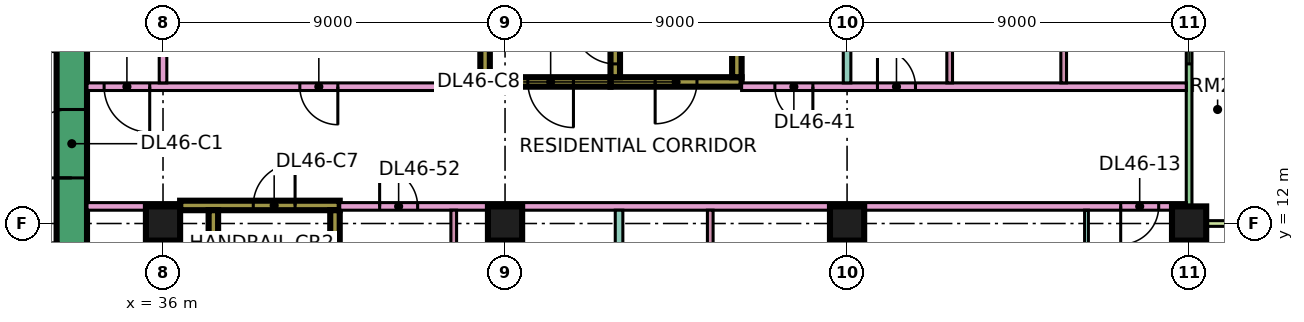
"""IFC4 building model, lengths in metres.
Left out: names, types, materials, properties, quantities, classifications, styles, units other than length and angle.
Written with IfcOpenShell. Run it as: python <this file> out.ifc"""

import sys

from ifc_helpers import new_model, si_unit, direction, frame, frame_2d, origin, origin_2d, place, context, subcontext, project, spatial, rectangle, extrude, element, fill, save


model = new_model("IFC4")
c1 = context("Model", 3, precision=1e-05, world=origin(), true_north=direction((0.0, 1.0)))
c2 = subcontext(c1, "Body", "Model", "MODEL_VIEW")
j1 = project(units=[si_unit("LENGTHUNIT", "METRE"), si_unit("PLANEANGLEUNIT", "RADIAN")], contexts=[c1])
p1 = place(None, origin())
s1 = spatial("IfcSite", under=j1, at=p1, CompositionType="ELEMENT")
p2 = place(p1, origin())
s2 = spatial("IfcBuilding", under=s1, at=p2, CompositionType="ELEMENT")
p3 = place(p2, frame((0.0, 0.0, 198.65)))
s3 = spatial("IfcBuildingStorey", under=s2, at=p3, CompositionType="ELEMENT", Elevation=198.65)
for number, where, z_axis, x_axis in (
    (1, (36.0, 12.0, 0.0), (0.0, 0.0, 1.0), (1.0, 0.0, 0.0)),
    (2, (45.0, 12.0, 0.0), (0.0, 0.0, 1.0), (1.0, 0.0, 0.0)),
    (3, (54.0, 12.0, 0.0), (0.0, 0.0, 1.0), (1.0, 0.0, 0.0)),
    (4, (63.0, 12.0, 0.0), (0.0, 0.0, 1.0), (1.0, 0.0, 0.0)),
):
    element("IfcColumn", number, at=place(p3, frame(where, z_axis=z_axis, x_axis=x_axis)), inside=s3, PredefinedType="COLUMN", context=c2, shape_type="SweptSolid", body=[
        extrude(rectangle(XDim=0.9, YDim=0.9, at=origin_2d()), origin(), (0.0, 0.0, 1.0), 3.75),
    ])
p4 = place(p3, frame((33.6, 7.8, 0.0), z_axis=(0.0, 0.0, 1.0), x_axis=(0.0, 1.0, 0.0)))
e5 = element("IfcWall", 5, at=p4, inside=s3, PredefinedType="SHEAR", context=c2, shape_type="SweptSolid", body=[
    extrude(rectangle(XDim=11.4, YDim=0.8, at=frame_2d((5.7, 0.0))), origin(), (0.0, 0.0, 1.0), 3.75),
])
p5 = place(p4, frame((5.4, 0.0, 0.0)))
e6 = element("IfcOpeningElement", 6, at=p5, cuts=e5, PredefinedType="OPENING", context=c2, shape_type="SweptSolid", body=[
    extrude(rectangle(XDim=1.8, YDim=2.4, at=frame_2d((0.9, 1.2))), frame((0.0, 0.41, 0.0), z_axis=(0.0, -1.0, 0.0), x_axis=(1.0, 0.0, 0.0)), (0.0, 0.0, 1.0), 0.82),
])
p6 = place(p3, frame((36.45, 12.475, 0.0), z_axis=(0.0, 0.0, 1.0), x_axis=(1.0, 0.0, 0.0)))
e7 = element("IfcWall", 7, at=p6, inside=s3, PredefinedType="SHEAR", context=c2, shape_type="SweptSolid", body=[
    extrude(rectangle(XDim=4.2, YDim=0.25, at=frame_2d((2.1, 0.0))), origin(), (0.0, 0.0, 1.0), 3.75),
])
p7 = place(p6, frame((1.925, 0.0, 0.0)))
e8 = element("IfcOpeningElement", 8, at=p7, cuts=e7, PredefinedType="OPENING", context=c2, shape_type="SweptSolid", body=[
    extrude(rectangle(XDim=1.1, YDim=2.2, at=frame_2d((0.55, 1.1))), frame((0.0, 0.135, 0.0), z_axis=(0.0, -1.0, 0.0), x_axis=(1.0, 0.0, 0.0)), (0.0, 0.0, 1.0), 0.27),
])
for number, where, z_axis, x_axis in (
    (9, (37.325, 5.85, 0.0), (0.0, 0.0, 1.0), (0.0, 1.0, 0.0)),
    (10, (40.525, 5.85, 0.0), (0.0, 0.0, 1.0), (0.0, 1.0, 0.0)),
):
    element("IfcWall", number, at=place(p3, frame(where, z_axis=z_axis, x_axis=x_axis)), inside=s3, PredefinedType="SHEAR", context=c2, shape_type="SweptSolid", body=[
        extrude(rectangle(XDim=6.5, YDim=0.25, at=frame_2d((3.25, 0.0))), origin(), (0.0, 0.0, 1.0), 3.75),
    ])
p8 = place(p3, frame((47.775, 15.725, 0.0), z_axis=(0.0, 0.0, 1.0), x_axis=(1.0, 0.0, 0.0)))
e11 = element("IfcWall", 11, at=p8, inside=s3, PredefinedType="SHEAR", context=c2, shape_type="SweptSolid", body=[
    extrude(rectangle(XDim=3.45, YDim=0.25, at=frame_2d((1.725, 0.0))), origin(), (0.0, 0.0, 1.0), 3.75),
])
p9 = place(p8, frame((1.175, 0.0, 0.0)))
e12 = element("IfcOpeningElement", 12, at=p9, cuts=e11, PredefinedType="OPENING", context=c2, shape_type="SweptSolid", body=[
    extrude(rectangle(XDim=1.1, YDim=2.2, at=frame_2d((0.55, 1.1))), frame((0.0, 0.135, 0.0), z_axis=(0.0, -1.0, 0.0), x_axis=(1.0, 0.0, 0.0)), (0.0, 0.0, 1.0), 0.27),
])
p10 = place(p3, frame((47.9, 15.85, 0.0), z_axis=(0.0, 0.0, 1.0), x_axis=(0.0, 1.0, 0.0)))
e13 = element("IfcWall", 13, at=p10, inside=s3, PredefinedType="SHEAR", context=c2, shape_type="SweptSolid", body=[
    extrude(rectangle(XDim=6.5, YDim=0.25, at=frame_2d((3.25, 0.0))), origin(), (0.0, 0.0, 1.0), 3.75),
])
p11 = place(p10, frame((0.35, 0.0, 0.0)))
e14 = element("IfcOpeningElement", 14, at=p11, cuts=e13, PredefinedType="OPENING", context=c2, shape_type="SweptSolid", body=[
    extrude(rectangle(XDim=1.1, YDim=2.2, at=frame_2d((0.55, 1.1))), frame((0.0, 0.135, 0.0), z_axis=(0.0, -1.0, 0.0), x_axis=(1.0, 0.0, 0.0)), (0.0, 0.0, 1.0), 0.27),
])
p12 = place(p3, frame((51.1, 15.85, 0.0), z_axis=(0.0, 0.0, 1.0), x_axis=(0.0, 1.0, 0.0)))
e15 = element("IfcWall", 15, at=p12, inside=s3, PredefinedType="SHEAR", context=c2, shape_type="SweptSolid", body=[
    extrude(rectangle(XDim=6.5, YDim=0.25, at=frame_2d((3.25, 0.0))), origin(), (0.0, 0.0, 1.0), 3.75),
])
p13 = place(p3, frame((44.35, 15.725, 0.0), z_axis=(0.0, 0.0, 1.0), x_axis=(1.0, 0.0, 0.0)))
e16 = element("IfcWall", 16, at=p13, inside=s3, PredefinedType="SHEAR", context=c2, shape_type="SweptSolid", body=[
    extrude(rectangle(XDim=3.425, YDim=0.25, at=frame_2d((1.712, 0.0))), origin(), (0.0, 0.0, 1.0), 3.75),
])
p14 = place(p13, frame((1.25, 0.0, 0.0)))
e17 = element("IfcOpeningElement", 17, at=p14, cuts=e16, PredefinedType="OPENING", context=c2, shape_type="SweptSolid", body=[
    extrude(rectangle(XDim=1.2, YDim=2.2, at=frame_2d((0.6, 1.1))), frame((0.0, 0.135, 0.0), z_axis=(0.0, -1.0, 0.0), x_axis=(1.0, 0.0, 0.0)), (0.0, 0.0, 1.0), 0.27),
])
p15 = place(p3, frame((44.475, 15.85, 0.0), z_axis=(0.0, 0.0, 1.0), x_axis=(0.0, 1.0, 0.0)))
e18 = element("IfcWall", 18, at=p15, inside=s3, PredefinedType="SHEAR", context=c2, shape_type="SweptSolid", body=[
    extrude(rectangle(XDim=6.5, YDim=0.25, at=frame_2d((3.25, 0.0))), origin(), (0.0, 0.0, 1.0), 3.75),
])
p16 = place(p15, frame((1.75, 0.0, 0.0)))
e19 = element("IfcOpeningElement", 19, at=p16, cuts=e18, PredefinedType="OPENING", context=c2, shape_type="SweptSolid", body=[
    extrude(rectangle(XDim=1.1, YDim=2.2, at=frame_2d((0.55, 1.1))), frame((0.0, 0.135, 0.0), z_axis=(0.0, -1.0, 0.0), x_axis=(1.0, 0.0, 0.0)), (0.0, 0.0, 1.0), 0.27),
])
p17 = place(p15, frame((4.3, 0.0, 0.0)))
e20 = element("IfcOpeningElement", 20, at=p17, cuts=e18, PredefinedType="OPENING", context=c2, shape_type="SweptSolid", body=[
    extrude(rectangle(XDim=1.1, YDim=2.2, at=frame_2d((0.55, 1.1))), frame((0.0, 0.135, 0.0), z_axis=(0.0, -1.0, 0.0), x_axis=(1.0, 0.0, 0.0)), (0.0, 0.0, 1.0), 0.27),
])
p18 = place(p3, frame((63.0, 12.075, 0.0), z_axis=(0.0, 0.0, 1.0), x_axis=(0.0, 1.0, 0.0)))
e21 = element("IfcWall", 21, at=p18, inside=s3, PredefinedType="SOLIDWALL", context=c2, shape_type="SweptSolid", body=[
    extrude(rectangle(XDim=10.35, YDim=0.15, at=frame_2d((5.175, 0.0))), origin(), (0.0, 0.0, 1.0), 3.35),
])
p19 = place(p18, frame((4.125, 0.0, 0.45)))
e22 = element("IfcOpeningElement", 22, at=p19, cuts=e21, PredefinedType="OPENING", context=c2, shape_type="SweptSolid", body=[
    extrude(rectangle(XDim=1.8, YDim=2.4, at=frame_2d((0.9, 1.2))), frame((0.0, 0.085, 0.0), z_axis=(0.0, -1.0, 0.0), x_axis=(1.0, 0.0, 0.0)), (0.0, 0.0, 1.0), 0.17),
])
p20 = place(p18, frame((8.137, 0.0, 0.45)))
e23 = element("IfcOpeningElement", 23, at=p20, cuts=e21, PredefinedType="OPENING", context=c2, shape_type="SweptSolid", body=[
    extrude(rectangle(XDim=1.8, YDim=2.4, at=frame_2d((0.9, 1.2))), frame((0.0, 0.085, 0.0), z_axis=(0.0, -1.0, 0.0), x_axis=(1.0, 0.0, 0.0)), (0.0, 0.0, 1.0), 0.17),
])
p21 = place(p3, frame((64.5, 12.0, 0.0), z_axis=(0.0, 0.0, 1.0), x_axis=(-1.0, 0.0, 0.0)))
e24 = element("IfcWall", 24, at=p21, inside=s3, PredefinedType="SOLIDWALL", context=c2, shape_type="SweptSolid", body=[
    extrude(rectangle(XDim=1.5, YDim=0.15, at=frame_2d((0.75, 0.0))), origin(), (0.0, 0.0, 1.0), 3.35),
])
p22 = place(p3, frame((34.0, 12.45, 0.0), z_axis=(0.0, 0.0, 1.0), x_axis=(1.0, 0.0, 0.0)))
e25 = element("IfcWall", 25, at=p22, inside=s3, PredefinedType="PARTITIONING", context=c2, shape_type="SweptSolid", body=[
    extrude(rectangle(XDim=2.451, YDim=0.2, at=frame_2d((1.226, 0.0))), origin(), (0.0, 0.0, 1.0), 3.35),
])
p23 = place(p3, frame((34.0, 15.6, 0.0), z_axis=(0.0, 0.0, 1.0), x_axis=(1.0, 0.0, 0.0)))
e26 = element("IfcWall", 26, at=p23, inside=s3, PredefinedType="PARTITIONING", context=c2, shape_type="SweptSolid", body=[
    extrude(rectangle(XDim=10.35, YDim=0.2, at=frame_2d((5.175, 0.0))), origin(), (0.0, 0.0, 1.0), 3.35),
])
p24 = place(p23, frame((5.6, 0.0, 0.0)))
e27 = element("IfcOpeningElement", 27, at=p24, cuts=e26, PredefinedType="OPENING", context=c2, shape_type="SweptSolid", body=[
    extrude(rectangle(XDim=1.0, YDim=2.1, at=frame_2d((0.5, 1.05))), frame((0.0, 0.11, 0.0), z_axis=(0.0, -1.0, 0.0), x_axis=(1.0, 0.0, 0.0)), (0.0, 0.0, 1.0), 0.22),
])
p25 = place(p23, frame((0.45, 0.0, 0.0)))
e28 = element("IfcOpeningElement", 28, at=p25, cuts=e26, PredefinedType="OPENING", context=c2, shape_type="SweptSolid", body=[
    extrude(rectangle(XDim=1.2, YDim=2.1, at=frame_2d((0.6, 1.05))), frame((0.0, 0.11, 0.0), z_axis=(0.0, -1.0, 0.0), x_axis=(1.0, 0.0, 0.0)), (0.0, 0.0, 1.0), 0.22),
])
p26 = place(p3, frame((36.0, 15.7, 0.0), z_axis=(0.0, 0.0, 1.0), x_axis=(0.0, 1.0, 0.0)))
e29 = element("IfcWall", 29, at=p26, inside=s3, PredefinedType="PARTITIONING", context=c2, shape_type="SweptSolid", body=[
    extrude(rectangle(XDim=8.3, YDim=0.2, at=frame_2d((4.15, 0.0))), origin(), (0.0, 0.0, 1.0), 3.35),
])
p27 = place(p3, frame((40.65, 12.45, 0.0), z_axis=(0.0, 0.0, 1.0), x_axis=(1.0, 0.0, 0.0)))
e30 = element("IfcWall", 30, at=p27, inside=s3, PredefinedType="PARTITIONING", context=c2, shape_type="SweptSolid", body=[
    extrude(rectangle(XDim=22.276, YDim=0.2, at=frame_2d((11.138, 0.0))), origin(), (0.0, 0.0, 1.0), 3.35),
])
p28 = place(p27, frame((20.55, 0.0, 0.0)))
e31 = element("IfcOpeningElement", 31, at=p28, cuts=e30, PredefinedType="OPENING", context=c2, shape_type="SweptSolid", body=[
    extrude(rectangle(XDim=1.0, YDim=2.1, at=frame_2d((0.5, 1.05))), frame((0.0, 0.11, 0.0), z_axis=(0.0, -1.0, 0.0), x_axis=(1.0, 0.0, 0.0)), (0.0, 0.0, 1.0), 0.22),
])
p29 = place(p27, frame((1.05, 0.0, 0.0)))
e32 = element("IfcOpeningElement", 32, at=p29, cuts=e30, PredefinedType="OPENING", context=c2, shape_type="SweptSolid", body=[
    extrude(rectangle(XDim=1.0, YDim=2.1, at=frame_2d((0.5, 1.05))), frame((0.0, 0.11, 0.0), z_axis=(0.0, -1.0, 0.0), x_axis=(1.0, 0.0, 0.0)), (0.0, 0.0, 1.0), 0.22),
])
p30 = place(p3, frame((43.65, 5.825, 0.0), z_axis=(0.0, 0.0, 1.0), x_axis=(0.0, 1.0, 0.0)))
e33 = element("IfcWall", 33, at=p30, inside=s3, PredefinedType="PARTITIONING", context=c2, shape_type="SweptSolid", body=[
    extrude(rectangle(XDim=6.525, YDim=0.15, at=frame_2d((3.263, 0.0))), origin(), (0.0, 0.0, 1.0), 3.35),
])
p31 = place(p30, frame((4.425, 0.0, 0.0)))
e34 = element("IfcOpeningElement", 34, at=p31, cuts=e33, PredefinedType="OPENING", context=c2, shape_type="SweptSolid", body=[
    extrude(rectangle(XDim=0.9, YDim=2.1, at=frame_2d((0.45, 1.05))), frame((0.0, 0.085, 0.0), z_axis=(0.0, -1.0, 0.0), x_axis=(1.0, 0.0, 0.0)), (0.0, 0.0, 1.0), 0.17),
])
p32 = place(p3, frame((48.0, 0.0, 0.0), z_axis=(0.0, 0.0, 1.0), x_axis=(0.0, 1.0, 0.0)))
e35 = element("IfcWall", 35, at=p32, inside=s3, PredefinedType="PARTITIONING", context=c2, shape_type="SweptSolid", body=[
    extrude(rectangle(XDim=12.35, YDim=0.2, at=frame_2d((6.175, 0.0))), origin(), (0.0, 0.0, 1.0), 3.35),
])
p33 = place(p3, frame((50.4, 7.725, 0.0), z_axis=(0.0, 0.0, 1.0), x_axis=(0.0, 1.0, 0.0)))
e36 = element("IfcWall", 36, at=p33, inside=s3, PredefinedType="PARTITIONING", context=c2, shape_type="SweptSolid", body=[
    extrude(rectangle(XDim=4.625, YDim=0.15, at=frame_2d((2.312, 0.0))), origin(), (0.0, 0.0, 1.0), 3.35),
])
p34 = place(p3, frame((51.225, 15.6, 0.0), z_axis=(0.0, 0.0, 1.0), x_axis=(1.0, 0.0, 0.0)))
e37 = element("IfcWall", 37, at=p34, inside=s3, PredefinedType="PARTITIONING", context=c2, shape_type="SweptSolid", body=[
    extrude(rectangle(XDim=11.701, YDim=0.2, at=frame_2d((5.851, 0.0))), origin(), (0.0, 0.0, 1.0), 3.35),
])
p35 = place(p34, frame((3.575, 0.0, 0.0)))
e38 = element("IfcOpeningElement", 38, at=p35, cuts=e37, PredefinedType="OPENING", context=c2, shape_type="SweptSolid", body=[
    extrude(rectangle(XDim=1.0, YDim=2.1, at=frame_2d((0.5, 1.05))), frame((0.0, 0.11, 0.0), z_axis=(0.0, -1.0, 0.0), x_axis=(1.0, 0.0, 0.0)), (0.0, 0.0, 1.0), 0.22),
])
p36 = place(p34, frame((0.875, 0.0, 0.0)))
e39 = element("IfcOpeningElement", 39, at=p36, cuts=e37, PredefinedType="OPENING", context=c2, shape_type="SweptSolid", body=[
    extrude(rectangle(XDim=1.0, YDim=2.1, at=frame_2d((0.5, 1.05))), frame((0.0, 0.11, 0.0), z_axis=(0.0, -1.0, 0.0), x_axis=(1.0, 0.0, 0.0)), (0.0, 0.0, 1.0), 0.22),
])
p37 = place(p3, frame((54.0, 7.725, 0.0), z_axis=(0.0, 0.0, 1.0), x_axis=(0.0, 1.0, 0.0)))
e40 = element("IfcWall", 40, at=p37, inside=s3, PredefinedType="PARTITIONING", context=c2, shape_type="SweptSolid", body=[
    extrude(rectangle(XDim=4.625, YDim=0.15, at=frame_2d((2.312, 0.0))), origin(), (0.0, 0.0, 1.0), 3.35),
])
p38 = place(p3, frame((54.0, 15.7, 0.0), z_axis=(0.0, 0.0, 1.0), x_axis=(0.0, 1.0, 0.0)))
e41 = element("IfcWall", 41, at=p38, inside=s3, PredefinedType="PARTITIONING", context=c2, shape_type="SweptSolid", body=[
    extrude(rectangle(XDim=8.3, YDim=0.2, at=frame_2d((4.15, 0.0))), origin(), (0.0, 0.0, 1.0), 3.35),
])
for number, where, z_axis, x_axis in (
    (42, (56.7, 15.7, 0.0), (0.0, 0.0, 1.0), (0.0, 1.0, 0.0)),
    (43, (59.7, 15.7, 0.0), (0.0, 0.0, 1.0), (0.0, 1.0, 0.0)),
):
    element("IfcWall", number, at=place(p3, frame(where, z_axis=z_axis, x_axis=x_axis)), inside=s3, PredefinedType="PARTITIONING", context=c2, shape_type="SweptSolid", body=[
        extrude(rectangle(XDim=2.825, YDim=0.15, at=frame_2d((1.413, 0.0))), origin(), (0.0, 0.0, 1.0), 3.35),
    ])
p39 = place(p3, frame((60.3, 7.725, 0.0), z_axis=(0.0, 0.0, 1.0), x_axis=(0.0, 1.0, 0.0)))
e44 = element("IfcWall", 44, at=p39, inside=s3, PredefinedType="PARTITIONING", context=c2, shape_type="SweptSolid", body=[
    extrude(rectangle(XDim=4.625, YDim=0.1, at=frame_2d((2.312, 0.0))), origin(), (0.0, 0.0, 1.0), 3.35),
])
p40 = place(p39, frame((1.875, 0.0, 0.0)))
e45 = element("IfcOpeningElement", 45, at=p40, cuts=e44, PredefinedType="OPENING", context=c2, shape_type="SweptSolid", body=[
    extrude(rectangle(XDim=0.9, YDim=2.1, at=frame_2d((0.45, 1.05))), frame((0.0, 0.06, 0.0), z_axis=(0.0, -1.0, 0.0), x_axis=(1.0, 0.0, 0.0)), (0.0, 0.0, 1.0), 0.12),
])
p41 = place(p19, origin())
e46 = element("IfcWindow", 46, at=p41, inside=s3, PartitioningType="SINGLE_PANEL", PredefinedType="WINDOW", context=c2, shape_type="SweptSolid", body=[
    extrude(rectangle(XDim=1.8, YDim=2.4, at=frame_2d((0.9, 1.2))), frame((0.0, 0.03, 0.0), z_axis=(0.0, -1.0, 0.0), x_axis=(1.0, 0.0, 0.0)), (0.0, 0.0, 1.0), 0.06),
])
fill(e22, e46)
p42 = place(p5, origin())
e47 = element("IfcDoor", 47, at=p42, inside=s3, OperationType="DOUBLE_DOOR_SINGLE_SWING", PredefinedType="DOOR", context=c2, shape_type="SweptSolid", body=[
    extrude(rectangle(XDim=1.8, YDim=2.4, at=frame_2d((0.9, 1.2))), frame((0.0, 0.025, 0.0), z_axis=(0.0, -1.0, 0.0), x_axis=(1.0, 0.0, 0.0)), (0.0, 0.0, 1.0), 0.05),
])
fill(e6, e47)
p43 = place(p7, frame((1.1, 0.0, 0.0), z_axis=(0.0, 0.0, 1.0), x_axis=(-1.0, 0.0, 0.0)))
e48 = element("IfcDoor", 48, at=p43, inside=s3, OperationType="SINGLE_SWING_RIGHT", PredefinedType="DOOR", context=c2, shape_type="SweptSolid", body=[
    extrude(rectangle(XDim=1.1, YDim=2.2, at=frame_2d((0.55, 1.1))), frame((0.0, 0.025, 0.0), z_axis=(0.0, -1.0, 0.0), x_axis=(1.0, 0.0, 0.0)), (0.0, 0.0, 1.0), 0.05),
])
fill(e8, e48)
p44 = place(p9, frame((1.1, 0.0, 0.0), z_axis=(0.0, 0.0, 1.0), x_axis=(-1.0, 0.0, 0.0)))
e49 = element("IfcDoor", 49, at=p44, inside=s3, OperationType="SINGLE_SWING_LEFT", PredefinedType="DOOR", context=c2, shape_type="SweptSolid", body=[
    extrude(rectangle(XDim=1.1, YDim=2.2, at=frame_2d((0.55, 1.1))), frame((0.0, 0.025, 0.0), z_axis=(0.0, -1.0, 0.0), x_axis=(1.0, 0.0, 0.0)), (0.0, 0.0, 1.0), 0.05),
])
fill(e12, e49)
p45 = place(p14, origin())
e50 = element("IfcDoor", 50, at=p45, inside=s3, OperationType="SINGLE_SWING_RIGHT", PredefinedType="DOOR", context=c2, shape_type="SweptSolid", body=[
    extrude(rectangle(XDim=1.2, YDim=2.2, at=frame_2d((0.6, 1.1))), frame((0.0, 0.025, 0.0), z_axis=(0.0, -1.0, 0.0), x_axis=(1.0, 0.0, 0.0)), (0.0, 0.0, 1.0), 0.05),
])
fill(e17, e50)
p46 = place(p11, frame((1.1, 0.0, 0.0), z_axis=(0.0, 0.0, 1.0), x_axis=(-1.0, 0.0, 0.0)))
e51 = element("IfcDoor", 51, at=p46, inside=s3, OperationType="SINGLE_SWING_RIGHT", PredefinedType="DOOR", context=c2, shape_type="SweptSolid", body=[
    extrude(rectangle(XDim=1.1, YDim=2.2, at=frame_2d((0.55, 1.1))), frame((0.0, 0.025, 0.0), z_axis=(0.0, -1.0, 0.0), x_axis=(1.0, 0.0, 0.0)), (0.0, 0.0, 1.0), 0.05),
])
fill(e14, e51)
p47 = place(p24, origin())
e52 = element("IfcDoor", 52, at=p47, inside=s3, OperationType="SINGLE_SWING_RIGHT", PredefinedType="DOOR", context=c2, shape_type="SweptSolid", body=[
    extrude(rectangle(XDim=1.0, YDim=2.1, at=frame_2d((0.5, 1.05))), frame((0.0, 0.025, 0.0), z_axis=(0.0, -1.0, 0.0), x_axis=(1.0, 0.0, 0.0)), (0.0, 0.0, 1.0), 0.05),
])
fill(e27, e52)
p48 = place(p35, origin())
e53 = element("IfcDoor", 53, at=p48, inside=s3, OperationType="SINGLE_SWING_LEFT", PredefinedType="DOOR", context=c2, shape_type="SweptSolid", body=[
    extrude(rectangle(XDim=1.0, YDim=2.1, at=frame_2d((0.5, 1.05))), frame((0.0, 0.025, 0.0), z_axis=(0.0, -1.0, 0.0), x_axis=(1.0, 0.0, 0.0)), (0.0, 0.0, 1.0), 0.05),
])
fill(e38, e53)
p49 = place(p28, frame((1.0, 0.0, 0.0), z_axis=(0.0, 0.0, 1.0), x_axis=(-1.0, 0.0, 0.0)))
e54 = element("IfcDoor", 54, at=p49, inside=s3, OperationType="SINGLE_SWING_LEFT", PredefinedType="DOOR", context=c2, shape_type="SweptSolid", body=[
    extrude(rectangle(XDim=1.0, YDim=2.1, at=frame_2d((0.5, 1.05))), frame((0.0, 0.025, 0.0), z_axis=(0.0, -1.0, 0.0), x_axis=(1.0, 0.0, 0.0)), (0.0, 0.0, 1.0), 0.05),
])
fill(e31, e54)
p50 = place(p25, origin())
e55 = element("IfcDoor", 55, at=p50, inside=s3, OperationType="SINGLE_SWING_RIGHT", PredefinedType="DOOR", context=c2, shape_type="SweptSolid", body=[
    extrude(rectangle(XDim=1.2, YDim=2.1, at=frame_2d((0.6, 1.05))), frame((0.0, 0.025, 0.0), z_axis=(0.0, -1.0, 0.0), x_axis=(1.0, 0.0, 0.0)), (0.0, 0.0, 1.0), 0.05),
])
fill(e28, e55)
p51 = place(p36, origin())
e56 = element("IfcDoor", 56, at=p51, inside=s3, OperationType="SINGLE_SWING_RIGHT", PredefinedType="DOOR", context=c2, shape_type="SweptSolid", body=[
    extrude(rectangle(XDim=1.0, YDim=2.1, at=frame_2d((0.5, 1.05))), frame((0.0, 0.025, 0.0), z_axis=(0.0, -1.0, 0.0), x_axis=(1.0, 0.0, 0.0)), (0.0, 0.0, 1.0), 0.05),
])
fill(e39, e56)
p52 = place(p29, origin())
e57 = element("IfcDoor", 57, at=p52, inside=s3, OperationType="SINGLE_SWING_LEFT", PredefinedType="DOOR", context=c2, shape_type="SweptSolid", body=[
    extrude(rectangle(XDim=1.0, YDim=2.1, at=frame_2d((0.5, 1.05))), frame((0.0, 0.025, 0.0), z_axis=(0.0, -1.0, 0.0), x_axis=(1.0, 0.0, 0.0)), (0.0, 0.0, 1.0), 0.05),
])
fill(e32, e57)
save(model, sys.argv[1])
